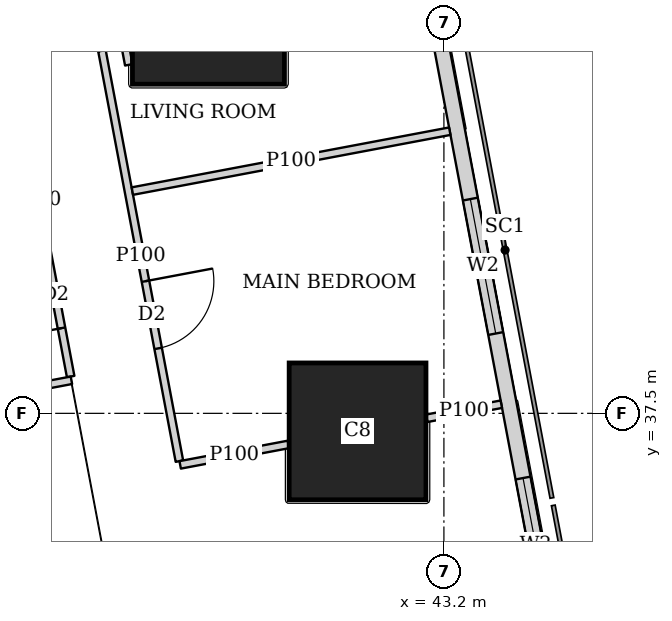
"""IFC4 building model, lengths in metres.
Left out: names, types, materials, properties, quantities, classifications, styles, units other than length and angle.
Written with IfcOpenShell. Run it as: python <this file> out.ifc"""

import sys

from ifc_helpers import new_model, si_unit, direction, frame, frame_2d, origin, origin_2d, place, context, subcontext, project, spatial, rectangle, extrude, element, fill, save


model = new_model("IFC4")
c1 = context("Model", 3, precision=1e-05, world=origin(), true_north=direction((0.0, 1.0)))
c2 = subcontext(c1, "Body", "Model", "MODEL_VIEW")
j1 = project(units=[si_unit("LENGTHUNIT", "METRE"), si_unit("PLANEANGLEUNIT", "RADIAN")], contexts=[c1])
p1 = place(None, origin())
s1 = spatial("IfcSite", under=j1, at=p1, CompositionType="ELEMENT")
p2 = place(p1, origin())
s2 = spatial("IfcBuilding", under=s1, at=p2, CompositionType="ELEMENT")
p3 = place(p2, frame((0.0, 0.0, 169.55)))
s3 = spatial("IfcBuildingStorey", under=s2, at=p3, CompositionType="ELEMENT", Elevation=169.55)
p4 = place(p3, frame((42.064, 37.263, 0.0), z_axis=(0.0, 0.0, 1.0), x_axis=(1.0, 0.0, 0.0)))
e1 = element("IfcColumn", 1, at=p4, inside=s3, PredefinedType="COLUMN", context=c2, shape_type="SweptSolid", body=[
    extrude(rectangle(XDim=1.8, YDim=1.8, at=origin_2d()), origin(), (0.0, 0.0, 1.0), 3.75),
])
p5 = place(p3, frame((40.102, 42.83, 0.0), z_axis=(0.0, 0.0, 1.0), x_axis=(1.0, 0.0, 0.0)))
e2 = element("IfcColumn", 2, at=p5, inside=s3, PredefinedType="COLUMN", context=c2, shape_type="SweptSolid", body=[
    extrude(rectangle(XDim=2.0, YDim=2.0, at=origin_2d()), origin(), (0.0, 0.0, 1.0), 3.75),
])
p6 = place(p3, frame((50.653, 2.703, 0.0), z_axis=(0.0, 0.0, 1.0), x_axis=(-0.185612026696, 0.982623109613, 0.0)))
e3 = element("IfcWall", 3, at=p6, inside=s3, PredefinedType="SOLIDWALL", context=c2, shape_type="SweptSolid", body=[
    extrude(rectangle(XDim=41.393, YDim=0.2, at=frame_2d((20.697, 0.0))), origin(), (0.0, 0.0, 1.0), 3.5),
])
p7 = place(p6, frame((1.633, 0.0, 0.9)))
e4 = element("IfcOpeningElement", 4, at=p7, cuts=e3, PredefinedType="OPENING", context=c2, shape_type="SweptSolid", body=[
    extrude(rectangle(XDim=1.8, YDim=1.5, at=frame_2d((0.9, 0.75))), frame((0.0, 0.11, 0.0), z_axis=(0.0, -1.0, 0.0), x_axis=(1.0, 0.0, 0.0)), (0.0, 0.0, 1.0), 0.22),
])
p8 = place(p6, frame((6.032, 0.0, 0.9)))
e5 = element("IfcOpeningElement", 5, at=p8, cuts=e3, PredefinedType="OPENING", context=c2, shape_type="SweptSolid", body=[
    extrude(rectangle(XDim=1.8, YDim=1.5, at=frame_2d((0.9, 0.75))), frame((0.0, 0.11, 0.0), z_axis=(0.0, -1.0, 0.0), x_axis=(1.0, 0.0, 0.0)), (0.0, 0.0, 1.0), 0.22),
])
p9 = place(p6, frame((9.848, 0.0, 0.9)))
e6 = element("IfcOpeningElement", 6, at=p9, cuts=e3, PredefinedType="OPENING", context=c2, shape_type="SweptSolid", body=[
    extrude(rectangle(XDim=1.8, YDim=1.5, at=frame_2d((0.9, 0.75))), frame((0.0, 0.11, 0.0), z_axis=(0.0, -1.0, 0.0), x_axis=(1.0, 0.0, 0.0)), (0.0, 0.0, 1.0), 0.22),
])
p10 = place(p6, frame((13.664, 0.0, 0.9)))
e7 = element("IfcOpeningElement", 7, at=p10, cuts=e3, PredefinedType="OPENING", context=c2, shape_type="SweptSolid", body=[
    extrude(rectangle(XDim=1.8, YDim=1.5, at=frame_2d((0.9, 0.75))), frame((0.0, 0.11, 0.0), z_axis=(0.0, -1.0, 0.0), x_axis=(1.0, 0.0, 0.0)), (0.0, 0.0, 1.0), 0.22),
])
p11 = place(p6, frame((17.481, 0.0, 0.9)))
e8 = element("IfcOpeningElement", 8, at=p11, cuts=e3, PredefinedType="OPENING", context=c2, shape_type="SweptSolid", body=[
    extrude(rectangle(XDim=1.8, YDim=1.5, at=frame_2d((0.9, 0.75))), frame((0.0, 0.11, 0.0), z_axis=(0.0, -1.0, 0.0), x_axis=(1.0, 0.0, 0.0)), (0.0, 0.0, 1.0), 0.22),
])
p12 = place(p6, frame((21.297, 0.0, 0.9)))
e9 = element("IfcOpeningElement", 9, at=p12, cuts=e3, PredefinedType="OPENING", context=c2, shape_type="SweptSolid", body=[
    extrude(rectangle(XDim=1.8, YDim=1.5, at=frame_2d((0.9, 0.75))), frame((0.0, 0.11, 0.0), z_axis=(0.0, -1.0, 0.0), x_axis=(1.0, 0.0, 0.0)), (0.0, 0.0, 1.0), 0.22),
])
p13 = place(p6, frame((25.113, 0.0, 0.9)))
e10 = element("IfcOpeningElement", 10, at=p13, cuts=e3, PredefinedType="OPENING", context=c2, shape_type="SweptSolid", body=[
    extrude(rectangle(XDim=1.8, YDim=1.5, at=frame_2d((0.9, 0.75))), frame((0.0, 0.11, 0.0), z_axis=(0.0, -1.0, 0.0), x_axis=(1.0, 0.0, 0.0)), (0.0, 0.0, 1.0), 0.22),
])
p14 = place(p6, frame((28.93, 0.0, 0.9)))
e11 = element("IfcOpeningElement", 11, at=p14, cuts=e3, PredefinedType="OPENING", context=c2, shape_type="SweptSolid", body=[
    extrude(rectangle(XDim=1.8, YDim=1.5, at=frame_2d((0.9, 0.75))), frame((0.0, 0.11, 0.0), z_axis=(0.0, -1.0, 0.0), x_axis=(1.0, 0.0, 0.0)), (0.0, 0.0, 1.0), 0.22),
])
p15 = place(p6, frame((32.746, 0.0, 0.9)))
e12 = element("IfcOpeningElement", 12, at=p15, cuts=e3, PredefinedType="OPENING", context=c2, shape_type="SweptSolid", body=[
    extrude(rectangle(XDim=1.8, YDim=1.5, at=frame_2d((0.9, 0.75))), frame((0.0, 0.11, 0.0), z_axis=(0.0, -1.0, 0.0), x_axis=(1.0, 0.0, 0.0)), (0.0, 0.0, 1.0), 0.22),
])
p16 = place(p6, frame((36.481, 0.0, 0.9)))
e13 = element("IfcOpeningElement", 13, at=p16, cuts=e3, PredefinedType="OPENING", context=c2, shape_type="SweptSolid", body=[
    extrude(rectangle(XDim=1.8, YDim=1.5, at=frame_2d((0.9, 0.75))), frame((0.0, 0.11, 0.0), z_axis=(0.0, -1.0, 0.0), x_axis=(1.0, 0.0, 0.0)), (0.0, 0.0, 1.0), 0.22),
])
p17 = place(p3, frame((33.877, 43.029, 0.0), z_axis=(0.0, 0.0, 1.0), x_axis=(0.185596841028, -0.98262597798, 0.0)))
e14 = element("IfcWall", 14, at=p17, inside=s3, PredefinedType="SOLIDWALL", context=c2, shape_type="SweptSolid", body=[
    extrude(rectangle(XDim=41.66, YDim=0.15, at=frame_2d((20.83, 0.0))), origin(), (0.0, 0.0, 1.0), 2.5),
])
p18 = place(p17, frame((8.63, 0.0, 0.0)))
e15 = element("IfcOpeningElement", 15, at=p18, cuts=e14, PredefinedType="OPENING", context=c2, shape_type="SweptSolid", body=[
    extrude(rectangle(XDim=1.0, YDim=2.1, at=frame_2d((0.5, 1.05))), frame((0.0, 0.085, 0.0), z_axis=(0.0, -1.0, 0.0), x_axis=(1.0, 0.0, 0.0)), (0.0, 0.0, 1.0), 0.17),
])
p19 = place(p17, frame((13.841, 0.0, 0.0)))
e16 = element("IfcOpeningElement", 16, at=p19, cuts=e14, PredefinedType="OPENING", context=c2, shape_type="SweptSolid", body=[
    extrude(rectangle(XDim=1.0, YDim=2.1, at=frame_2d((0.5, 1.05))), frame((0.0, 0.085, 0.0), z_axis=(0.0, -1.0, 0.0), x_axis=(1.0, 0.0, 0.0)), (0.0, 0.0, 1.0), 0.17),
])
p20 = place(p17, frame((21.474, 0.0, 0.0)))
e17 = element("IfcOpeningElement", 17, at=p20, cuts=e14, PredefinedType="OPENING", context=c2, shape_type="SweptSolid", body=[
    extrude(rectangle(XDim=1.0, YDim=2.1, at=frame_2d((0.5, 1.05))), frame((0.0, 0.085, 0.0), z_axis=(0.0, -1.0, 0.0), x_axis=(1.0, 0.0, 0.0)), (0.0, 0.0, 1.0), 0.17),
])
p21 = place(p17, frame((30.4, 0.0, 0.0)))
e18 = element("IfcOpeningElement", 18, at=p21, cuts=e14, PredefinedType="OPENING", context=c2, shape_type="SweptSolid", body=[
    extrude(rectangle(XDim=1.0, YDim=2.1, at=frame_2d((0.5, 1.05))), frame((0.0, 0.085, 0.0), z_axis=(0.0, -1.0, 0.0), x_axis=(1.0, 0.0, 0.0)), (0.0, 0.0, 1.0), 0.17),
])
p22 = place(p17, frame((32.288, 0.0, 0.0)))
e19 = element("IfcOpeningElement", 19, at=p22, cuts=e14, PredefinedType="OPENING", context=c2, shape_type="SweptSolid", body=[
    extrude(rectangle(XDim=1.0, YDim=2.1, at=frame_2d((0.5, 1.05))), frame((0.0, 0.085, 0.0), z_axis=(0.0, -1.0, 0.0), x_axis=(1.0, 0.0, 0.0)), (0.0, 0.0, 1.0), 0.17),
])
p23 = place(p3, frame((39.054, 42.085, 0.0), z_axis=(0.0, 0.0, 1.0), x_axis=(-0.185791584218, 0.982589175207, 0.0)))
e20 = element("IfcWall", 20, at=p23, inside=s3, PredefinedType="PARTITIONING", context=c2, shape_type="SweptSolid", body=[
    extrude(rectangle(XDim=3.628, YDim=0.1, at=frame_2d((1.814, 0.0))), origin(), (0.0, 0.0, 1.0), 2.1),
])
p24 = place(p3, frame((38.701, 42.27, 0.0), z_axis=(0.0, 0.0, 1.0), x_axis=(0.185474244877, -0.982649125826, 0.0)))
e21 = element("IfcWall", 21, at=p24, inside=s3, PredefinedType="PARTITIONING", context=c2, shape_type="SweptSolid", body=[
    extrude(rectangle(XDim=5.494, YDim=0.1, at=frame_2d((2.747, 0.0))), origin(), (0.0, 0.0, 1.0), 3.5),
])
p25 = place(p24, frame((3.085, 0.0, 0.0)))
e22 = element("IfcOpeningElement", 22, at=p25, cuts=e21, PredefinedType="OPENING", context=c2, shape_type="SweptSolid", body=[
    extrude(rectangle(XDim=0.9, YDim=2.1, at=frame_2d((0.45, 1.05))), frame((0.0, 0.06, 0.0), z_axis=(0.0, -1.0, 0.0), x_axis=(1.0, 0.0, 0.0)), (0.0, 0.0, 1.0), 0.12),
])
p26 = place(p3, frame((37.41, 42.639, 0.0), z_axis=(0.0, 0.0, 1.0), x_axis=(0.185579683022, -0.982629218601, 0.0)))
e23 = element("IfcWall", 23, at=p26, inside=s3, PredefinedType="PARTITIONING", context=c2, shape_type="SweptSolid", body=[
    extrude(rectangle(XDim=4.737, YDim=0.1, at=frame_2d((2.369, 0.0))), origin(), (0.0, 0.0, 1.0), 3.5),
])
p27 = place(p26, frame((3.189, 0.0, 0.0)))
e24 = element("IfcOpeningElement", 24, at=p27, cuts=e23, PredefinedType="OPENING", context=c2, shape_type="SweptSolid", body=[
    extrude(rectangle(XDim=0.9, YDim=2.1, at=frame_2d((0.45, 1.05))), frame((0.0, 0.06, 0.0), z_axis=(0.0, -1.0, 0.0), x_axis=(1.0, 0.0, 0.0)), (0.0, 0.0, 1.0), 0.12),
])
p28 = place(p26, frame((1.131, 0.0, 0.0)))
e25 = element("IfcOpeningElement", 25, at=p28, cuts=e23, PredefinedType="OPENING", context=c2, shape_type="SweptSolid", body=[
    extrude(rectangle(XDim=0.9, YDim=2.1, at=frame_2d((0.45, 1.05))), frame((0.0, 0.06, 0.0), z_axis=(0.0, -1.0, 0.0), x_axis=(1.0, 0.0, 0.0)), (0.0, 0.0, 1.0), 0.12),
])
p29 = place(p3, frame((43.277, 41.212, 0.0), z_axis=(0.0, 0.0, 1.0), x_axis=(-0.982665405803, -0.185387972203, 0.0)))
e26 = element("IfcWall", 26, at=p29, inside=s3, PredefinedType="PARTITIONING", context=c2, shape_type="SweptSolid", body=[
    extrude(rectangle(XDim=4.25, YDim=0.1, at=frame_2d((2.125, 0.0))), origin(), (0.0, 0.0, 1.0), 2.1),
])
p30 = place(p3, frame((43.955, 37.62, 0.0), z_axis=(0.0, 0.0, 1.0), x_axis=(-0.982666697719, -0.185381124159, 0.0)))
e27 = element("IfcWall", 27, at=p30, inside=s3, PredefinedType="PARTITIONING", context=c2, shape_type="SweptSolid", body=[
    extrude(rectangle(XDim=0.998, YDim=0.1, at=frame_2d((0.499, 0.0))), origin(), (0.0, 0.0, 1.0), 3.5),
])
p31 = place(p3, frame((41.154, 37.091, 0.0), z_axis=(0.0, 0.0, 1.0), x_axis=(-0.982617614942, -0.185641112921, 0.0)))
e28 = element("IfcWall", 28, at=p31, inside=s3, PredefinedType="PARTITIONING", context=c2, shape_type="SweptSolid", body=[
    extrude(rectangle(XDim=1.449, YDim=0.1, at=frame_2d((0.725, 0.0))), origin(), (0.0, 0.0, 1.0), 3.5),
])
p32 = place(p3, frame((38.299, 37.935, 0.0), z_axis=(0.0, 0.0, 1.0), x_axis=(-0.98258870752, -0.18579405764, 0.0)))
e29 = element("IfcWall", 29, at=p32, inside=s3, PredefinedType="PARTITIONING", context=c2, shape_type="SweptSolid", body=[
    extrude(rectangle(XDim=1.566, YDim=0.1, at=frame_2d((0.783, 0.0))), origin(), (0.0, 0.0, 1.0), 3.5),
])
p33 = place(p15, origin())
e30 = element("IfcWindow", 30, at=p33, inside=s3, PartitioningType="SINGLE_PANEL", PredefinedType="WINDOW", context=c2, shape_type="SweptSolid", body=[
    extrude(rectangle(XDim=1.8, YDim=1.5, at=frame_2d((0.9, 0.75))), frame((0.0, 0.03, 0.0), z_axis=(0.0, -1.0, 0.0), x_axis=(1.0, 0.0, 0.0)), (0.0, 0.0, 1.0), 0.06),
])
fill(e12, e30)
p34 = place(p16, origin())
e31 = element("IfcWindow", 31, at=p34, inside=s3, PartitioningType="SINGLE_PANEL", PredefinedType="WINDOW", context=c2, shape_type="SweptSolid", body=[
    extrude(rectangle(XDim=1.8, YDim=1.5, at=frame_2d((0.9, 0.75))), frame((0.0, 0.03, 0.0), z_axis=(0.0, -1.0, 0.0), x_axis=(1.0, 0.0, 0.0)), (0.0, 0.0, 1.0), 0.06),
])
fill(e13, e31)
p35 = place(p25, origin())
e32 = element("IfcDoor", 32, at=p35, inside=s3, OperationType="SINGLE_SWING_LEFT", PredefinedType="DOOR", context=c2, shape_type="SweptSolid", body=[
    extrude(rectangle(XDim=0.9, YDim=2.1, at=frame_2d((0.45, 1.05))), frame((0.0, 0.025, 0.0), z_axis=(0.0, -1.0, 0.0), x_axis=(1.0, 0.0, 0.0)), (0.0, 0.0, 1.0), 0.05),
])
fill(e22, e32)
p36 = place(p27, origin())
e33 = element("IfcDoor", 33, at=p36, inside=s3, OperationType="SINGLE_SWING_LEFT", PredefinedType="DOOR", context=c2, shape_type="SweptSolid", body=[
    extrude(rectangle(XDim=0.9, YDim=2.1, at=frame_2d((0.45, 1.05))), frame((0.0, 0.025, 0.0), z_axis=(0.0, -1.0, 0.0), x_axis=(1.0, 0.0, 0.0)), (0.0, 0.0, 1.0), 0.05),
])
fill(e24, e33)
save(model, sys.argv[1])
